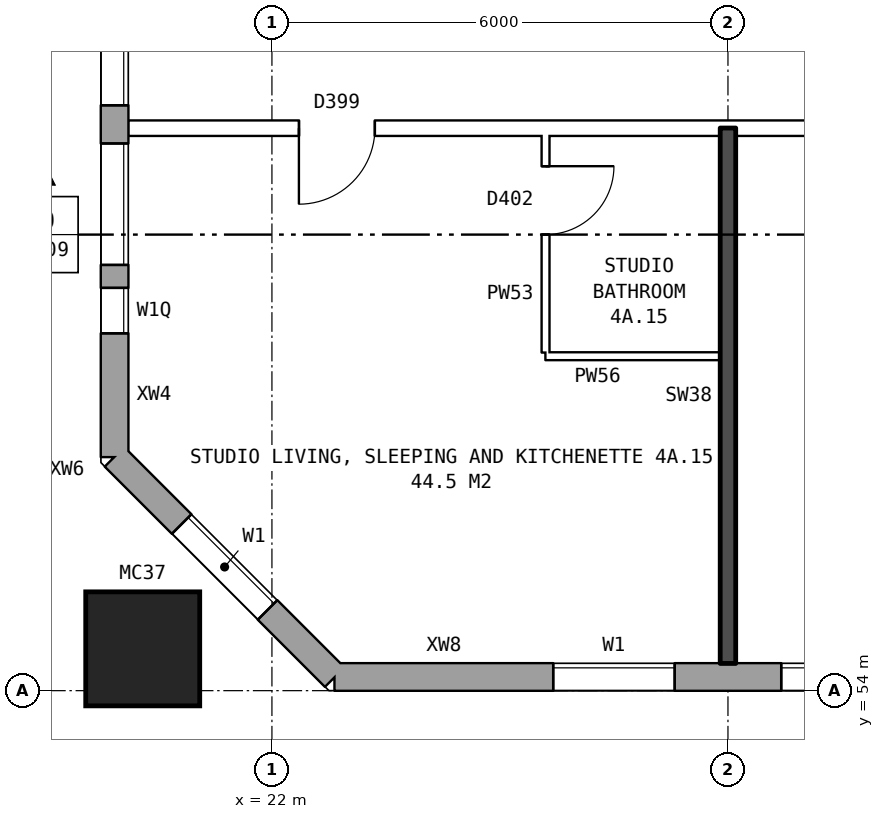
"""IFC4 building model, lengths in metres.
Left out: names, types, materials, properties, quantities, classifications, styles, units other than length and angle.
Written with IfcOpenShell. Run it as: python <this file> out.ifc"""

import sys

from ifc_helpers import new_model, si_unit, direction, frame, frame_2d, origin, origin_2d, place, context, subcontext, project, spatial, rectangle, hollow_rectangle, extrude, element, fill, save


model = new_model("IFC4")
c1 = context("Model", 3, precision=1e-05, world=origin(), true_north=direction((0.0, 1.0)))
c2 = subcontext(c1, "Body", "Model", "MODEL_VIEW")
j1 = project(units=[si_unit("LENGTHUNIT", "METRE"), si_unit("PLANEANGLEUNIT", "RADIAN")], contexts=[c1])
p1 = place(None, origin())
s1 = spatial("IfcSite", under=j1, at=p1, CompositionType="ELEMENT")
p2 = place(p1, origin())
s2 = spatial("IfcBuilding", under=s1, at=p2, CompositionType="ELEMENT")
p3 = place(p2, frame((0.0, 0.0, 19.5)))
s3 = spatial("IfcBuildingStorey", under=s2, at=p3, CompositionType="ELEMENT", Elevation=19.5)
p4 = place(p3, frame((20.3, 54.55, 0.0), z_axis=(0.0, 0.0, 1.0), x_axis=(1.0, 0.0, 0.0)))
e1 = element("IfcColumn", 1, at=p4, inside=s3, PredefinedType="COLUMN", context=c2, shape_type="SweptSolid", body=[
    extrude(hollow_rectangle(XDim=1.5, YDim=1.5, WallThickness=0.08, at=origin_2d()), origin(), (0.0, 0.0, 1.0), 3.1),
])
p5 = place(p3, frame((19.93, 57.075, 0.0), z_axis=(0.0, 0.0, 1.0), x_axis=(0.707106781187, -0.707106781187, 0.0)))
e2 = element("IfcWall", 2, at=p5, inside=s3, PredefinedType="STANDARD", context=c2, shape_type="SweptSolid", body=[
    extrude(rectangle(XDim=4.094, YDim=0.36, at=frame_2d((2.047, 0.0))), origin(), (0.0, 0.0, 1.0), 2.85),
])
p6 = place(p5, frame((1.247, 0.0, 0.8)))
e3 = element("IfcOpeningElement", 3, at=p6, cuts=e2, PredefinedType="OPENING", context=c2, shape_type="SweptSolid", body=[
    extrude(rectangle(XDim=1.6, YDim=1.8, at=frame_2d((0.8, 0.9))), frame((0.0, 0.19, 0.0), z_axis=(0.0, -1.0, 0.0), x_axis=(1.0, 0.0, 0.0)), (0.0, 0.0, 1.0), 0.38),
])
p7 = place(p3, frame((22.825, 54.18, 0.0), z_axis=(0.0, 0.0, 1.0), x_axis=(1.0, 0.0, 0.0)))
e4 = element("IfcWall", 4, at=p7, inside=s3, PredefinedType="STANDARD", context=c2, shape_type="SweptSolid", body=[
    extrude(rectangle(XDim=50.101, YDim=0.36, at=frame_2d((25.05, 0.0))), origin(), (0.0, 0.0, 1.0), 2.85),
])
p8 = place(p7, frame((2.875, 0.0, 0.8)))
e5 = element("IfcOpeningElement", 5, at=p8, cuts=e4, PredefinedType="OPENING", context=c2, shape_type="SweptSolid", body=[
    extrude(rectangle(XDim=1.6, YDim=1.8, at=frame_2d((0.8, 0.9))), frame((0.0, 0.19, 0.0), z_axis=(0.0, -1.0, 0.0), x_axis=(1.0, 0.0, 0.0)), (0.0, 0.0, 1.0), 0.38),
])
p9 = place(p7, frame((5.875, 0.0, 0.8)))
e6 = element("IfcOpeningElement", 6, at=p9, cuts=e4, PredefinedType="OPENING", context=c2, shape_type="SweptSolid", body=[
    extrude(rectangle(XDim=1.6, YDim=1.8, at=frame_2d((0.8, 0.9))), frame((0.0, 0.19, 0.0), z_axis=(0.0, -1.0, 0.0), x_axis=(1.0, 0.0, 0.0)), (0.0, 0.0, 1.0), 0.38),
])
p10 = place(p7, frame((8.875, 0.0, 0.8)))
e7 = element("IfcOpeningElement", 7, at=p10, cuts=e4, PredefinedType="OPENING", context=c2, shape_type="SweptSolid", body=[
    extrude(rectangle(XDim=1.6, YDim=1.8, at=frame_2d((0.8, 0.9))), frame((0.0, 0.19, 0.0), z_axis=(0.0, -1.0, 0.0), x_axis=(1.0, 0.0, 0.0)), (0.0, 0.0, 1.0), 0.38),
])
p11 = place(p7, frame((11.875, 0.0, 0.8)))
e8 = element("IfcOpeningElement", 8, at=p11, cuts=e4, PredefinedType="OPENING", context=c2, shape_type="SweptSolid", body=[
    extrude(rectangle(XDim=1.6, YDim=1.8, at=frame_2d((0.8, 0.9))), frame((0.0, 0.19, 0.0), z_axis=(0.0, -1.0, 0.0), x_axis=(1.0, 0.0, 0.0)), (0.0, 0.0, 1.0), 0.38),
])
p12 = place(p7, frame((14.875, 0.0, 0.8)))
e9 = element("IfcOpeningElement", 9, at=p12, cuts=e4, PredefinedType="OPENING", context=c2, shape_type="SweptSolid", body=[
    extrude(rectangle(XDim=1.6, YDim=1.8, at=frame_2d((0.8, 0.9))), frame((0.0, 0.19, 0.0), z_axis=(0.0, -1.0, 0.0), x_axis=(1.0, 0.0, 0.0)), (0.0, 0.0, 1.0), 0.38),
])
p13 = place(p7, frame((17.875, 0.0, 0.8)))
e10 = element("IfcOpeningElement", 10, at=p13, cuts=e4, PredefinedType="OPENING", context=c2, shape_type="SweptSolid", body=[
    extrude(rectangle(XDim=1.6, YDim=1.8, at=frame_2d((0.8, 0.9))), frame((0.0, 0.19, 0.0), z_axis=(0.0, -1.0, 0.0), x_axis=(1.0, 0.0, 0.0)), (0.0, 0.0, 1.0), 0.38),
])
p14 = place(p7, frame((20.875, 0.0, 0.8)))
e11 = element("IfcOpeningElement", 11, at=p14, cuts=e4, PredefinedType="OPENING", context=c2, shape_type="SweptSolid", body=[
    extrude(rectangle(XDim=1.6, YDim=1.8, at=frame_2d((0.8, 0.9))), frame((0.0, 0.19, 0.0), z_axis=(0.0, -1.0, 0.0), x_axis=(1.0, 0.0, 0.0)), (0.0, 0.0, 1.0), 0.38),
])
p15 = place(p7, frame((23.875, 0.0, 0.8)))
e12 = element("IfcOpeningElement", 12, at=p15, cuts=e4, PredefinedType="OPENING", context=c2, shape_type="SweptSolid", body=[
    extrude(rectangle(XDim=1.6, YDim=1.8, at=frame_2d((0.8, 0.9))), frame((0.0, 0.19, 0.0), z_axis=(0.0, -1.0, 0.0), x_axis=(1.0, 0.0, 0.0)), (0.0, 0.0, 1.0), 0.38),
])
p16 = place(p7, frame((26.875, 0.0, 0.8)))
e13 = element("IfcOpeningElement", 13, at=p16, cuts=e4, PredefinedType="OPENING", context=c2, shape_type="SweptSolid", body=[
    extrude(rectangle(XDim=1.6, YDim=1.8, at=frame_2d((0.8, 0.9))), frame((0.0, 0.19, 0.0), z_axis=(0.0, -1.0, 0.0), x_axis=(1.0, 0.0, 0.0)), (0.0, 0.0, 1.0), 0.38),
])
p17 = place(p7, frame((29.875, 0.0, 0.8)))
e14 = element("IfcOpeningElement", 14, at=p17, cuts=e4, PredefinedType="OPENING", context=c2, shape_type="SweptSolid", body=[
    extrude(rectangle(XDim=1.6, YDim=1.8, at=frame_2d((0.8, 0.9))), frame((0.0, 0.19, 0.0), z_axis=(0.0, -1.0, 0.0), x_axis=(1.0, 0.0, 0.0)), (0.0, 0.0, 1.0), 0.38),
])
p18 = place(p7, frame((32.875, 0.0, 0.8)))
e15 = element("IfcOpeningElement", 15, at=p18, cuts=e4, PredefinedType="OPENING", context=c2, shape_type="SweptSolid", body=[
    extrude(rectangle(XDim=1.6, YDim=1.8, at=frame_2d((0.8, 0.9))), frame((0.0, 0.19, 0.0), z_axis=(0.0, -1.0, 0.0), x_axis=(1.0, 0.0, 0.0)), (0.0, 0.0, 1.0), 0.38),
])
p19 = place(p7, frame((35.875, 0.0, 0.8)))
e16 = element("IfcOpeningElement", 16, at=p19, cuts=e4, PredefinedType="OPENING", context=c2, shape_type="SweptSolid", body=[
    extrude(rectangle(XDim=1.6, YDim=1.8, at=frame_2d((0.8, 0.9))), frame((0.0, 0.19, 0.0), z_axis=(0.0, -1.0, 0.0), x_axis=(1.0, 0.0, 0.0)), (0.0, 0.0, 1.0), 0.38),
])
p20 = place(p7, frame((38.875, 0.0, 0.8)))
e17 = element("IfcOpeningElement", 17, at=p20, cuts=e4, PredefinedType="OPENING", context=c2, shape_type="SweptSolid", body=[
    extrude(rectangle(XDim=1.6, YDim=1.8, at=frame_2d((0.8, 0.9))), frame((0.0, 0.19, 0.0), z_axis=(0.0, -1.0, 0.0), x_axis=(1.0, 0.0, 0.0)), (0.0, 0.0, 1.0), 0.38),
])
p21 = place(p7, frame((41.875, 0.0, 0.8)))
e18 = element("IfcOpeningElement", 18, at=p21, cuts=e4, PredefinedType="OPENING", context=c2, shape_type="SweptSolid", body=[
    extrude(rectangle(XDim=1.6, YDim=1.8, at=frame_2d((0.8, 0.9))), frame((0.0, 0.19, 0.0), z_axis=(0.0, -1.0, 0.0), x_axis=(1.0, 0.0, 0.0)), (0.0, 0.0, 1.0), 0.38),
])
p22 = place(p7, frame((44.875, 0.0, 0.8)))
e19 = element("IfcOpeningElement", 19, at=p22, cuts=e4, PredefinedType="OPENING", context=c2, shape_type="SweptSolid", body=[
    extrude(rectangle(XDim=1.6, YDim=1.8, at=frame_2d((0.8, 0.9))), frame((0.0, 0.19, 0.0), z_axis=(0.0, -1.0, 0.0), x_axis=(1.0, 0.0, 0.0)), (0.0, 0.0, 1.0), 0.38),
])
p23 = place(p7, frame((47.375, 0.0, 0.8)))
e20 = element("IfcOpeningElement", 20, at=p23, cuts=e4, PredefinedType="OPENING", context=c2, shape_type="SweptSolid", body=[
    extrude(rectangle(XDim=1.0, YDim=1.5, at=frame_2d((0.5, 0.75))), frame((0.0, 0.19, 0.0), z_axis=(0.0, -1.0, 0.0), x_axis=(1.0, 0.0, 0.0)), (0.0, 0.0, 1.0), 0.38),
])
p24 = place(p7, frame((48.675, 0.0, 0.8)))
e21 = element("IfcOpeningElement", 21, at=p24, cuts=e4, PredefinedType="OPENING", context=c2, shape_type="SweptSolid", body=[
    extrude(rectangle(XDim=0.6, YDim=0.9, at=frame_2d((0.3, 0.45))), frame((0.0, 0.19, 0.0), z_axis=(0.0, -1.0, 0.0), x_axis=(1.0, 0.0, 0.0)), (0.0, 0.0, 1.0), 0.38),
])
p25 = place(p3, frame((19.93, 82.925, 0.0), z_axis=(0.0, 0.0, 1.0), x_axis=(0.0, -1.0, 0.0)))
e22 = element("IfcWall", 22, at=p25, inside=s3, PredefinedType="STANDARD", context=c2, shape_type="SweptSolid", body=[
    extrude(rectangle(XDim=25.851, YDim=0.36, at=frame_2d((12.925, 0.0))), origin(), (0.0, 0.0, 1.0), 2.85),
])
p26 = place(p25, frame((1.0, 0.0, 0.8)))
e23 = element("IfcOpeningElement", 23, at=p26, cuts=e22, PredefinedType="OPENING", context=c2, shape_type="SweptSolid", body=[
    extrude(rectangle(XDim=1.2, YDim=0.9, at=frame_2d((0.6, 0.45))), frame((0.0, 0.19, 0.0), z_axis=(0.0, -1.0, 0.0), x_axis=(1.0, 0.0, 0.0)), (0.0, 0.0, 1.0), 0.38),
])
p27 = place(p25, frame((4.625, 0.0, 0.8)))
e24 = element("IfcOpeningElement", 24, at=p27, cuts=e22, PredefinedType="OPENING", context=c2, shape_type="SweptSolid", body=[
    extrude(rectangle(XDim=1.6, YDim=1.8, at=frame_2d((0.8, 0.9))), frame((0.0, 0.19, 0.0), z_axis=(0.0, -1.0, 0.0), x_axis=(1.0, 0.0, 0.0)), (0.0, 0.0, 1.0), 0.38),
])
p28 = place(p25, frame((7.625, 0.0, 0.8)))
e25 = element("IfcOpeningElement", 25, at=p28, cuts=e22, PredefinedType="OPENING", context=c2, shape_type="SweptSolid", body=[
    extrude(rectangle(XDim=1.6, YDim=1.8, at=frame_2d((0.8, 0.9))), frame((0.0, 0.19, 0.0), z_axis=(0.0, -1.0, 0.0), x_axis=(1.0, 0.0, 0.0)), (0.0, 0.0, 1.0), 0.38),
])
p29 = place(p25, frame((10.625, 0.0, 0.8)))
e26 = element("IfcOpeningElement", 26, at=p29, cuts=e22, PredefinedType="OPENING", context=c2, shape_type="SweptSolid", body=[
    extrude(rectangle(XDim=1.6, YDim=1.8, at=frame_2d((0.8, 0.9))), frame((0.0, 0.19, 0.0), z_axis=(0.0, -1.0, 0.0), x_axis=(1.0, 0.0, 0.0)), (0.0, 0.0, 1.0), 0.38),
])
p30 = place(p25, frame((13.625, 0.0, 0.8)))
e27 = element("IfcOpeningElement", 27, at=p30, cuts=e22, PredefinedType="OPENING", context=c2, shape_type="SweptSolid", body=[
    extrude(rectangle(XDim=1.6, YDim=1.8, at=frame_2d((0.8, 0.9))), frame((0.0, 0.19, 0.0), z_axis=(0.0, -1.0, 0.0), x_axis=(1.0, 0.0, 0.0)), (0.0, 0.0, 1.0), 0.38),
])
p31 = place(p25, frame((16.625, 0.0, 0.8)))
e28 = element("IfcOpeningElement", 28, at=p31, cuts=e22, PredefinedType="OPENING", context=c2, shape_type="SweptSolid", body=[
    extrude(rectangle(XDim=1.6, YDim=1.8, at=frame_2d((0.8, 0.9))), frame((0.0, 0.19, 0.0), z_axis=(0.0, -1.0, 0.0), x_axis=(1.0, 0.0, 0.0)), (0.0, 0.0, 1.0), 0.38),
])
p32 = place(p25, frame((19.625, 0.0, 0.8)))
e29 = element("IfcOpeningElement", 29, at=p32, cuts=e22, PredefinedType="OPENING", context=c2, shape_type="SweptSolid", body=[
    extrude(rectangle(XDim=1.6, YDim=1.8, at=frame_2d((0.8, 0.9))), frame((0.0, 0.19, 0.0), z_axis=(0.0, -1.0, 0.0), x_axis=(1.0, 0.0, 0.0)), (0.0, 0.0, 1.0), 0.38),
])
p33 = place(p25, frame((21.725, 0.0, 0.8)))
e30 = element("IfcOpeningElement", 30, at=p33, cuts=e22, PredefinedType="OPENING", context=c2, shape_type="SweptSolid", body=[
    extrude(rectangle(XDim=1.6, YDim=1.8, at=frame_2d((0.8, 0.9))), frame((0.0, 0.19, 0.0), z_axis=(0.0, -1.0, 0.0), x_axis=(1.0, 0.0, 0.0)), (0.0, 0.0, 1.0), 0.38),
])
p34 = place(p25, frame((2.5, 0.0, 0.8)))
e31 = element("IfcOpeningElement", 31, at=p34, cuts=e22, PredefinedType="OPENING", context=c2, shape_type="SweptSolid", body=[
    extrude(rectangle(XDim=1.4, YDim=1.8, at=frame_2d((0.7, 0.9))), frame((0.0, 0.19, 0.0), z_axis=(0.0, -1.0, 0.0), x_axis=(1.0, 0.0, 0.0)), (0.0, 0.0, 1.0), 0.38),
])
p35 = place(p25, frame((23.625, 0.0, 0.8)))
e32 = element("IfcOpeningElement", 32, at=p35, cuts=e22, PredefinedType="OPENING", context=c2, shape_type="SweptSolid", body=[
    extrude(rectangle(XDim=0.6, YDim=1.2, at=frame_2d((0.3, 0.6))), frame((0.0, 0.19, 0.0), z_axis=(0.0, -1.0, 0.0), x_axis=(1.0, 0.0, 0.0)), (0.0, 0.0, 1.0), 0.38),
])
p36 = place(p3, frame((25.6, 58.4, 0.0), z_axis=(0.0, 0.0, 1.0), x_axis=(1.0, 0.0, 0.0)))
e33 = element("IfcWall", 33, at=p36, inside=s3, PredefinedType="PARTITIONING", context=c2, shape_type="SweptSolid", body=[
    extrude(rectangle(XDim=2.3, YDim=0.1, at=frame_2d((1.15, 0.0))), origin(), (0.0, 0.0, 1.0), 2.85),
])
p37 = place(p3, frame((20.11, 61.4, 0.0), z_axis=(0.0, 0.0, 1.0), x_axis=(1.0, 0.0, 0.0)))
e34 = element("IfcWall", 34, at=p37, inside=s3, PredefinedType="PARTITIONING", context=c2, shape_type="SweptSolid", body=[
    extrude(rectangle(XDim=25.79, YDim=0.2, at=frame_2d((12.895, 0.0))), origin(), (0.0, 0.0, 1.0), 2.85),
])
p38 = place(p37, frame((22.34, 0.0, 0.0)))
e35 = element("IfcOpeningElement", 35, at=p38, cuts=e34, PredefinedType="OPENING", context=c2, shape_type="SweptSolid", body=[
    extrude(rectangle(XDim=1.0, YDim=2.1, at=frame_2d((0.5, 1.05))), frame((0.0, 0.11, 0.0), z_axis=(0.0, -1.0, 0.0), x_axis=(1.0, 0.0, 0.0)), (0.0, 0.0, 1.0), 0.22),
])
p39 = place(p37, frame((10.39, 0.0, 0.0)))
e36 = element("IfcOpeningElement", 36, at=p39, cuts=e34, PredefinedType="OPENING", context=c2, shape_type="SweptSolid", body=[
    extrude(rectangle(XDim=1.0, YDim=2.1, at=frame_2d((0.5, 1.05))), frame((0.0, 0.11, 0.0), z_axis=(0.0, -1.0, 0.0), x_axis=(1.0, 0.0, 0.0)), (0.0, 0.0, 1.0), 0.22),
])
p40 = place(p37, frame((2.245, 0.0, 0.0)))
e37 = element("IfcOpeningElement", 37, at=p40, cuts=e34, PredefinedType="OPENING", context=c2, shape_type="SweptSolid", body=[
    extrude(rectangle(XDim=1.0, YDim=2.1, at=frame_2d((0.5, 1.05))), frame((0.0, 0.11, 0.0), z_axis=(0.0, -1.0, 0.0), x_axis=(1.0, 0.0, 0.0)), (0.0, 0.0, 1.0), 0.22),
])
p41 = place(p3, frame((25.6, 58.45, 0.0), z_axis=(0.0, 0.0, 1.0), x_axis=(0.0, 1.0, 0.0)))
e38 = element("IfcWall", 38, at=p41, inside=s3, PredefinedType="PARTITIONING", context=c2, shape_type="SweptSolid", body=[
    extrude(rectangle(XDim=2.85, YDim=0.1, at=frame_2d((1.425, 0.0))), origin(), (0.0, 0.0, 1.0), 2.85),
])
p42 = place(p41, frame((1.55, 0.0, 0.0)))
e39 = element("IfcOpeningElement", 39, at=p42, cuts=e38, PredefinedType="OPENING", context=c2, shape_type="SweptSolid", body=[
    extrude(rectangle(XDim=0.9, YDim=2.1, at=frame_2d((0.45, 1.05))), frame((0.0, 0.06, 0.0), z_axis=(0.0, -1.0, 0.0), x_axis=(1.0, 0.0, 0.0)), (0.0, 0.0, 1.0), 0.12),
])
p43 = place(p3, frame((28.0, 54.36, 0.0), z_axis=(0.0, 0.0, 1.0), x_axis=(0.0, 1.0, 0.0)))
e40 = element("IfcWall", 40, at=p43, inside=s3, PredefinedType="SOLIDWALL", context=c2, shape_type="SweptSolid", body=[
    extrude(rectangle(XDim=7.04, YDim=0.2, at=frame_2d((3.52, 0.0))), origin(), (0.0, 0.0, 1.0), 2.85),
])
p44 = place(p6, origin())
e41 = element("IfcWindow", 41, at=p44, inside=s3, PartitioningType="SINGLE_PANEL", PredefinedType="WINDOW", context=c2, shape_type="SweptSolid", body=[
    extrude(rectangle(XDim=1.6, YDim=1.8, at=frame_2d((0.8, 0.9))), frame((0.0, 0.15, 0.0), z_axis=(0.0, -1.0, 0.0), x_axis=(1.0, 0.0, 0.0)), (0.0, 0.0, 1.0), 0.06),
])
fill(e3, e41)
p45 = place(p8, origin())
e42 = element("IfcWindow", 42, at=p45, inside=s3, PartitioningType="SINGLE_PANEL", PredefinedType="WINDOW", context=c2, shape_type="SweptSolid", body=[
    extrude(rectangle(XDim=1.6, YDim=1.8, at=frame_2d((0.8, 0.9))), frame((0.0, 0.15, 0.0), z_axis=(0.0, -1.0, 0.0), x_axis=(1.0, 0.0, 0.0)), (0.0, 0.0, 1.0), 0.06),
])
fill(e5, e42)
p46 = place(p9, origin())
e43 = element("IfcWindow", 43, at=p46, inside=s3, PartitioningType="SINGLE_PANEL", PredefinedType="WINDOW", context=c2, shape_type="SweptSolid", body=[
    extrude(rectangle(XDim=1.6, YDim=1.8, at=frame_2d((0.8, 0.9))), frame((0.0, 0.15, 0.0), z_axis=(0.0, -1.0, 0.0), x_axis=(1.0, 0.0, 0.0)), (0.0, 0.0, 1.0), 0.06),
])
fill(e6, e43)
p47 = place(p32, origin())
e44 = element("IfcWindow", 44, at=p47, inside=s3, PartitioningType="SINGLE_PANEL", PredefinedType="WINDOW", context=c2, shape_type="SweptSolid", body=[
    extrude(rectangle(XDim=1.6, YDim=1.8, at=frame_2d((0.8, 0.9))), frame((0.0, 0.15, 0.0), z_axis=(0.0, -1.0, 0.0), x_axis=(1.0, 0.0, 0.0)), (0.0, 0.0, 1.0), 0.06),
])
fill(e29, e44)
p48 = place(p33, origin())
e45 = element("IfcWindow", 45, at=p48, inside=s3, PartitioningType="SINGLE_PANEL", PredefinedType="WINDOW", context=c2, shape_type="SweptSolid", body=[
    extrude(rectangle(XDim=1.6, YDim=1.8, at=frame_2d((0.8, 0.9))), frame((0.0, 0.15, 0.0), z_axis=(0.0, -1.0, 0.0), x_axis=(1.0, 0.0, 0.0)), (0.0, 0.0, 1.0), 0.06),
])
fill(e30, e45)
p49 = place(p40, frame((1.0, 0.0, 0.0), z_axis=(0.0, 0.0, 1.0), x_axis=(-1.0, 0.0, 0.0)))
e46 = element("IfcDoor", 46, at=p49, inside=s3, OperationType="SINGLE_SWING_RIGHT", PredefinedType="DOOR", context=c2, shape_type="SweptSolid", body=[
    extrude(rectangle(XDim=1.0, YDim=2.1, at=frame_2d((0.5, 1.05))), frame((0.0, 0.025, 0.0), z_axis=(0.0, -1.0, 0.0), x_axis=(1.0, 0.0, 0.0)), (0.0, 0.0, 1.0), 0.05),
])
fill(e37, e46)
p50 = place(p42, frame((0.9, 0.0, 0.0), z_axis=(0.0, 0.0, 1.0), x_axis=(-1.0, 0.0, 0.0)))
e47 = element("IfcDoor", 47, at=p50, inside=s3, OperationType="SINGLE_SWING_LEFT", PredefinedType="DOOR", context=c2, shape_type="SweptSolid", body=[
    extrude(rectangle(XDim=0.9, YDim=2.1, at=frame_2d((0.45, 1.05))), frame((0.0, 0.025, 0.0), z_axis=(0.0, -1.0, 0.0), x_axis=(1.0, 0.0, 0.0)), (0.0, 0.0, 1.0), 0.05),
])
fill(e39, e47)
p51 = place(p35, origin())
e48 = element("IfcWindow", 48, at=p51, inside=s3, PartitioningType="SINGLE_PANEL", PredefinedType="WINDOW", context=c2, shape_type="SweptSolid", body=[
    extrude(rectangle(XDim=0.6, YDim=1.2, at=frame_2d((0.3, 0.6))), frame((0.0, 0.15, 0.0), z_axis=(0.0, -1.0, 0.0), x_axis=(1.0, 0.0, 0.0)), (0.0, 0.0, 1.0), 0.06),
])
fill(e32, e48)
save(model, sys.argv[1])
